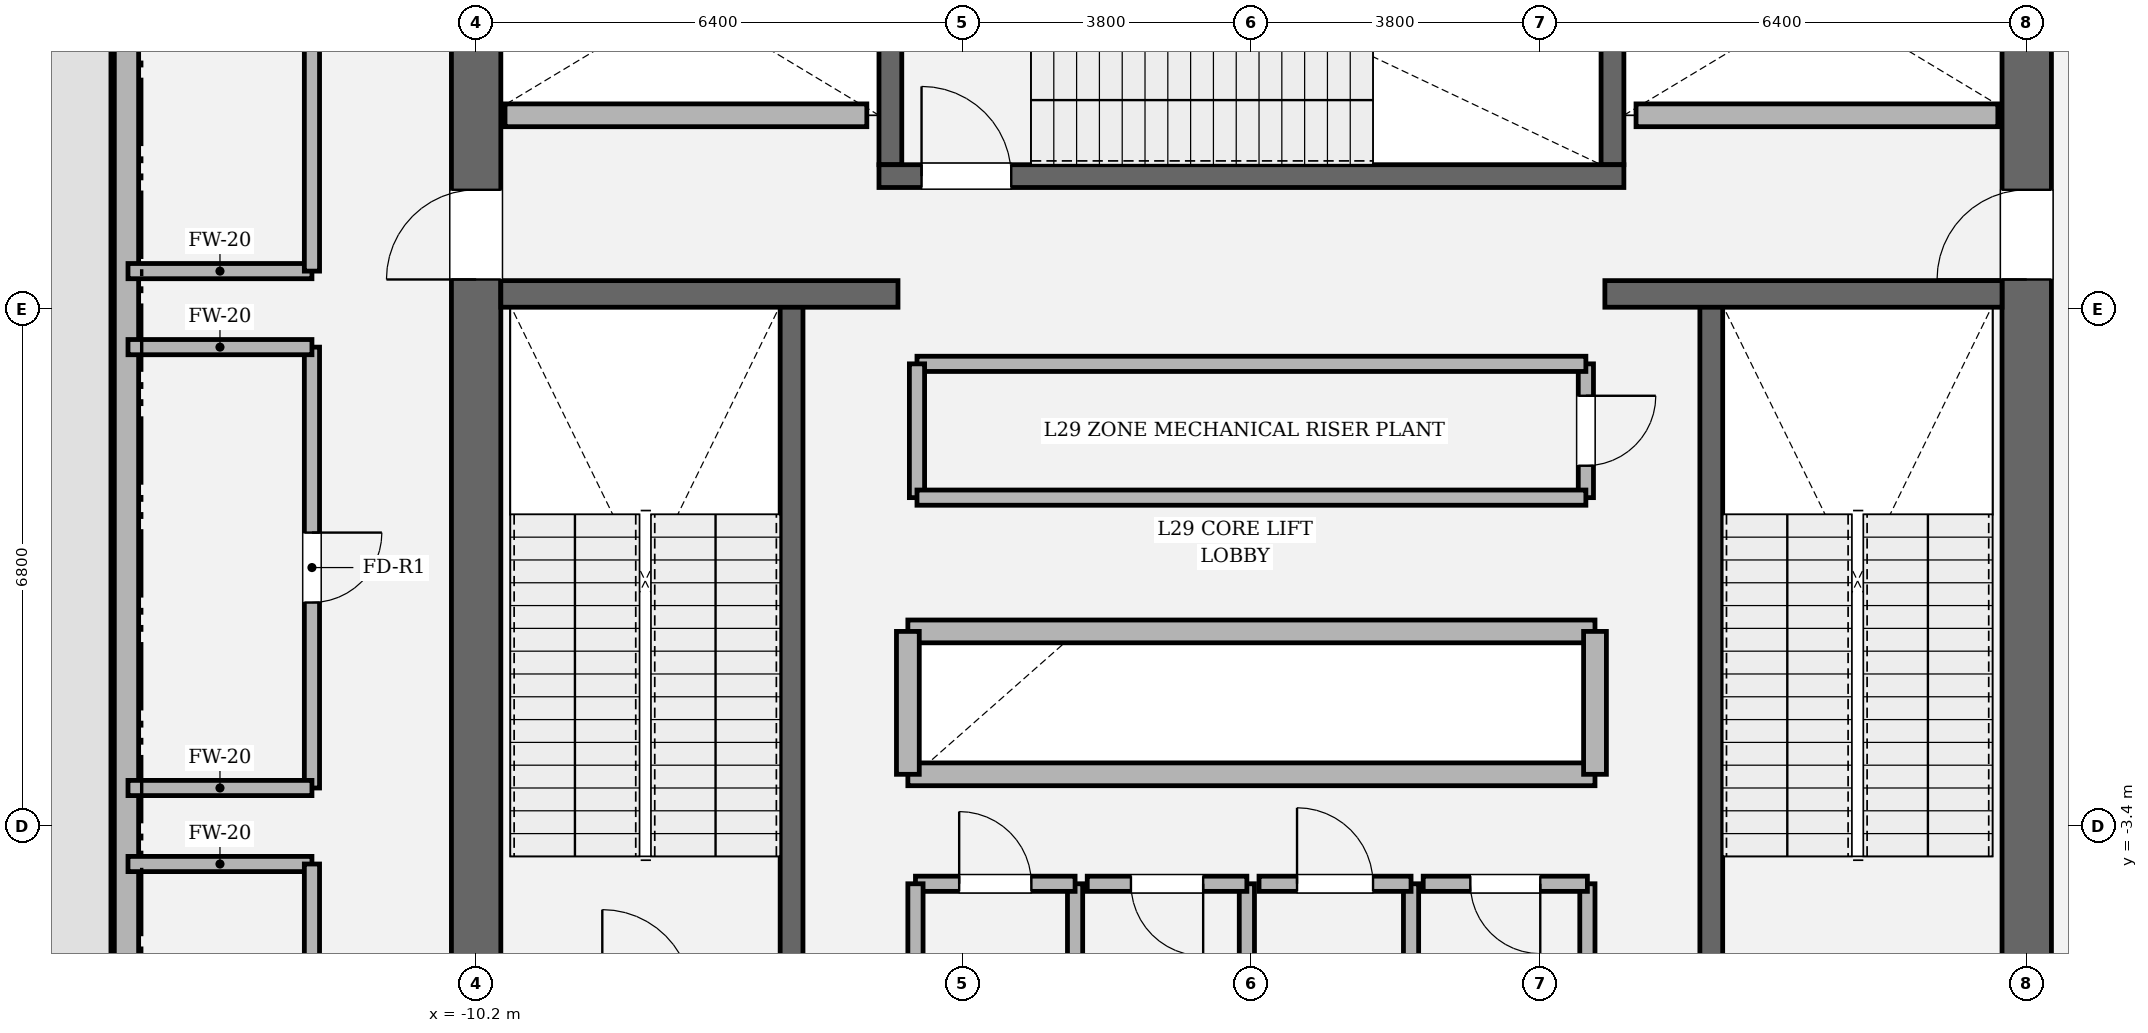
"""IFC4 building model, lengths in metres.
Left out: names, types, materials, properties, quantities, classifications, styles, units other than length and angle.
Written with IfcOpenShell. Run it as: python <this file> out.ifc"""

import sys

from ifc_helpers import new_model, si_unit, direction, frame, frame_2d, origin, place, context, subcontext, project, spatial, rectangle, extrude, element, fill, save


model = new_model("IFC4")
c1 = context("Model", 3, precision=1e-05, world=origin(), true_north=direction((0.0, 1.0)))
c2 = subcontext(c1, "Body", "Model", "MODEL_VIEW")
j1 = project(units=[si_unit("LENGTHUNIT", "METRE"), si_unit("PLANEANGLEUNIT", "RADIAN")], contexts=[c1])
p1 = place(None, origin())
s1 = spatial("IfcSite", under=j1, at=p1, CompositionType="ELEMENT")
p2 = place(p1, origin())
s2 = spatial("IfcBuilding", under=s1, at=p2, CompositionType="ELEMENT")
p3 = place(p2, frame((0.0, 0.0, 125.4)))
s3 = spatial("IfcBuildingStorey", under=s2, at=p3, CompositionType="ELEMENT", Elevation=125.4)
p4 = place(p3, frame((-10.2, -8.875, 0.0), z_axis=(0.0, 0.0, 1.0), x_axis=(0.0, 1.0, 0.0)))
e1 = element("IfcWall", 1, at=p4, inside=s3, PredefinedType="SHEAR", context=c2, shape_type="SweptSolid", body=[
    extrude(rectangle(XDim=17.75, YDim=0.65, at=frame_2d((8.875, 0.0))), origin(), (0.0, 0.0, 1.0), 4.8),
])
p5 = place(p4, frame((12.665, 0.0, 0.0)))
e2 = element("IfcOpeningElement", 2, at=p5, cuts=e1, PredefinedType="OPENING", context=c2, shape_type="SweptSolid", body=[
    extrude(rectangle(XDim=1.18, YDim=2.2, at=frame_2d((0.59, 1.1))), frame((0.0, 0.335, 0.0), z_axis=(0.0, -1.0, 0.0), x_axis=(1.0, 0.0, 0.0)), (0.0, 0.0, 1.0), 0.67),
])
p6 = place(p3, frame((10.2, 8.875, 0.0), z_axis=(0.0, 0.0, 1.0), x_axis=(0.0, -1.0, 0.0)))
e3 = element("IfcWall", 3, at=p6, inside=s3, PredefinedType="SHEAR", context=c2, shape_type="SweptSolid", body=[
    extrude(rectangle(XDim=17.75, YDim=0.65, at=frame_2d((8.875, 0.0))), origin(), (0.0, 0.0, 1.0), 4.8),
])
p7 = place(p6, frame((3.905, 0.0, 0.0)))
e4 = element("IfcOpeningElement", 4, at=p7, cuts=e3, PredefinedType="OPENING", context=c2, shape_type="SweptSolid", body=[
    extrude(rectangle(XDim=1.18, YDim=2.2, at=frame_2d((0.59, 1.1))), frame((0.0, 0.335, 0.0), z_axis=(0.0, -1.0, 0.0), x_axis=(1.0, 0.0, 0.0)), (0.0, 0.0, 1.0), 0.67),
])
for number, where, z_axis, x_axis in (
    (5, (-6.05, -5.5, 0.0), (0.0, 0.0, 1.0), (0.0, 1.0, 0.0)),
    (6, (6.05, 3.45, 0.0), (0.0, 0.0, 1.0), (0.0, -1.0, 0.0)),
):
    element("IfcWall", number, at=place(p3, frame(where, z_axis=z_axis, x_axis=x_axis)), inside=s3, PredefinedType="SOLIDWALL", context=c2, shape_type="SweptSolid", body=[
        extrude(rectangle(XDim=8.95, YDim=0.3, at=frame_2d((4.475, 0.0))), origin(), (0.0, 0.0, 1.0), 4.8),
    ])
for number, where, z_axis, x_axis in (
    (7, (-4.75, 5.3, 0.0), (0.0, 0.0, 1.0), (0.0, 1.0, 0.0)),
    (8, (4.75, 8.875, 0.0), (0.0, 0.0, 1.0), (0.0, -1.0, 0.0)),
):
    element("IfcWall", number, at=place(p3, frame(where, z_axis=z_axis, x_axis=x_axis)), inside=s3, PredefinedType="SOLIDWALL", context=c2, shape_type="SweptSolid", body=[
        extrude(rectangle(XDim=3.575, YDim=0.3, at=frame_2d((1.788, 0.0))), origin(), (0.0, 0.0, 1.0), 4.8),
    ])
p8 = place(p3, frame((-4.9, 5.15, 0.0), z_axis=(0.0, 0.0, 1.0), x_axis=(1.0, 0.0, 0.0)))
e9 = element("IfcWall", 9, at=p8, inside=s3, PredefinedType="SOLIDWALL", context=c2, shape_type="SweptSolid", body=[
    extrude(rectangle(XDim=9.8, YDim=0.3, at=frame_2d((4.9, 0.0))), origin(), (0.0, 0.0, 1.0), 4.8),
])
p9 = place(p8, frame((0.56, 0.0, 0.0)))
e10 = element("IfcOpeningElement", 10, at=p9, cuts=e9, PredefinedType="OPENING", context=c2, shape_type="SweptSolid", body=[
    extrude(rectangle(XDim=1.18, YDim=2.2, at=frame_2d((0.59, 1.1))), frame((0.0, 0.16, 0.0), z_axis=(0.0, -1.0, 0.0), x_axis=(1.0, 0.0, 0.0)), (0.0, 0.0, 1.0), 0.32),
])
for number, where, z_axis, x_axis in (
    (11, (-9.875, 3.6, 0.0), (0.0, 0.0, 1.0), (1.0, 0.0, 0.0)),
    (12, (4.65, 3.6, 0.0), (0.0, 0.0, 1.0), (1.0, 0.0, 0.0)),
):
    element("IfcWall", number, at=place(p3, frame(where, z_axis=z_axis, x_axis=x_axis)), inside=s3, PredefinedType="SOLIDWALL", context=c2, shape_type="SweptSolid", body=[
        extrude(rectangle(XDim=5.225, YDim=0.35, at=frame_2d((2.613, 0.0))), origin(), (0.0, 0.0, 1.0), 4.8),
    ])
p10 = place(p3, frame((-14.8, 11.387, 0.0), z_axis=(0.0, 0.0, 1.0), x_axis=(0.0, -1.0, 0.0)))
e13 = element("IfcWall", 13, at=p10, inside=s3, PredefinedType="SOLIDWALL", context=c2, shape_type="SweptSolid", body=[
    extrude(rectangle(XDim=22.774, YDim=0.32, at=frame_2d((11.387, 0.0))), origin(), (0.0, 0.0, 1.0), 3.194),
])
p11 = place(p10, frame((2.2, 0.0, 0.9)))
e14 = element("IfcOpeningElement", 14, at=p11, cuts=e13, PredefinedType="OPENING", context=c2, shape_type="SweptSolid", body=[
    extrude(rectangle(XDim=2.2, YDim=1.2, at=frame_2d((1.1, 0.6))), frame((0.0, 0.17, 0.0), z_axis=(0.0, -1.0, 0.0), x_axis=(1.0, 0.0, 0.0)), (0.0, 0.0, 1.0), 0.34),
])
p12 = place(p10, frame((18.374, 0.0, 0.9)))
e15 = element("IfcOpeningElement", 15, at=p12, cuts=e13, PredefinedType="OPENING", context=c2, shape_type="SweptSolid", body=[
    extrude(rectangle(XDim=2.2, YDim=1.2, at=frame_2d((1.1, 0.6))), frame((0.0, 0.17, 0.0), z_axis=(0.0, -1.0, 0.0), x_axis=(1.0, 0.0, 0.0)), (0.0, 0.0, 1.0), 0.34),
])
for number, where, z_axis, x_axis in (
    (16, (-4.52, -0.84, 0.0), (0.0, 0.0, 1.0), (1.0, 0.0, 0.0)),
    (17, (-4.52, -2.72, 0.0), (0.0, 0.0, 1.0), (1.0, 0.0, 0.0)),
):
    element("IfcWall", number, at=place(p3, frame(where, z_axis=z_axis, x_axis=x_axis)), inside=s3, PredefinedType="SOLIDWALL", context=c2, shape_type="SweptSolid", body=[
        extrude(rectangle(XDim=9.04, YDim=0.3, at=frame_2d((4.52, 0.0))), origin(), (0.0, 0.0, 1.0), 4.48),
    ])
for number, where, z_axis, x_axis in (
    (18, (-4.52, -2.72, 0.0), (0.0, 0.0, 1.0), (0.0, 1.0, 0.0)),
    (19, (4.52, -2.72, 0.0), (0.0, 0.0, 1.0), (0.0, 1.0, 0.0)),
):
    element("IfcWall", number, at=place(p3, frame(where, z_axis=z_axis, x_axis=x_axis)), inside=s3, PredefinedType="SOLIDWALL", context=c2, shape_type="SweptSolid", body=[
        extrude(rectangle(XDim=1.88, YDim=0.3, at=frame_2d((0.94, 0.0))), origin(), (0.0, 0.0, 1.0), 4.48),
    ])
for number, where, z_axis, x_axis in (
    (20, (-9.82, 5.95, 0.0), (0.0, 0.0, 1.0), (1.0, 0.0, 0.0)),
    (21, (5.06, 5.95, 0.0), (0.0, 0.0, 1.0), (1.0, 0.0, 0.0)),
):
    element("IfcWall", number, at=place(p3, frame(where, z_axis=z_axis, x_axis=x_axis)), inside=s3, PredefinedType="SOLIDWALL", context=c2, shape_type="SweptSolid", body=[
        extrude(rectangle(XDim=4.76, YDim=0.3, at=frame_2d((2.38, 0.0))), origin(), (0.0, 0.0, 1.0), 4.48),
    ])
p13 = place(p3, frame((-2.32, -5.9, 0.0), z_axis=(0.0, 0.0, 1.0), x_axis=(0.0, 1.0, 0.0)))
e22 = element("IfcWall", 22, at=p13, inside=s3, PredefinedType="SOLIDWALL", context=c2, shape_type="SweptSolid", body=[
    extrude(rectangle(XDim=1.74, YDim=0.2, at=frame_2d((0.87, 0.0))), origin(), (0.0, 0.0, 1.0), 4.48),
])
p14 = place(p3, frame((-2.32, -4.16, 0.0), z_axis=(0.0, 0.0, 1.0), x_axis=(-1.0, 0.0, 0.0)))
e23 = element("IfcWall", 23, at=p14, inside=s3, PredefinedType="SOLIDWALL", context=c2, shape_type="SweptSolid", body=[
    extrude(rectangle(XDim=2.1, YDim=0.2, at=frame_2d((1.05, 0.0))), origin(), (0.0, 0.0, 1.0), 4.48),
])
p15 = place(p14, frame((0.575, 0.0, 0.0)))
e24 = element("IfcOpeningElement", 24, at=p15, cuts=e23, PredefinedType="OPENING", context=c2, shape_type="SweptSolid", body=[
    extrude(rectangle(XDim=0.95, YDim=2.15, at=frame_2d((0.475, 1.075))), frame((0.0, 0.11, 0.0), z_axis=(0.0, -1.0, 0.0), x_axis=(1.0, 0.0, 0.0)), (0.0, 0.0, 1.0), 0.22),
])
for number, where, z_axis, x_axis in (
    (25, (-4.42, -4.16, 0.0), (0.0, 0.0, 1.0), (0.0, -1.0, 0.0)),
    (26, (-0.06, -5.9, 0.0), (0.0, 0.0, 1.0), (0.0, 1.0, 0.0)),
):
    element("IfcWall", number, at=place(p3, frame(where, z_axis=z_axis, x_axis=x_axis)), inside=s3, PredefinedType="SOLIDWALL", context=c2, shape_type="SweptSolid", body=[
        extrude(rectangle(XDim=1.74, YDim=0.2, at=frame_2d((0.87, 0.0))), origin(), (0.0, 0.0, 1.0), 4.48),
    ])
p16 = place(p3, frame((-0.06, -4.16, 0.0), z_axis=(0.0, 0.0, 1.0), x_axis=(-1.0, 0.0, 0.0)))
e27 = element("IfcWall", 27, at=p16, inside=s3, PredefinedType="SOLIDWALL", context=c2, shape_type="SweptSolid", body=[
    extrude(rectangle(XDim=2.1, YDim=0.2, at=frame_2d((1.05, 0.0))), origin(), (0.0, 0.0, 1.0), 4.48),
])
p17 = place(p16, frame((0.575, 0.0, 0.0)))
e28 = element("IfcOpeningElement", 28, at=p17, cuts=e27, PredefinedType="OPENING", context=c2, shape_type="SweptSolid", body=[
    extrude(rectangle(XDim=0.95, YDim=2.15, at=frame_2d((0.475, 1.075))), frame((0.0, 0.11, 0.0), z_axis=(0.0, -1.0, 0.0), x_axis=(1.0, 0.0, 0.0)), (0.0, 0.0, 1.0), 0.22),
])
p18 = place(p3, frame((2.1, -5.9, 0.0), z_axis=(0.0, 0.0, 1.0), x_axis=(0.0, 1.0, 0.0)))
e29 = element("IfcWall", 29, at=p18, inside=s3, PredefinedType="SOLIDWALL", context=c2, shape_type="SweptSolid", body=[
    extrude(rectangle(XDim=1.74, YDim=0.2, at=frame_2d((0.87, 0.0))), origin(), (0.0, 0.0, 1.0), 4.48),
])
p19 = place(p3, frame((2.1, -4.16, 0.0), z_axis=(0.0, 0.0, 1.0), x_axis=(-1.0, 0.0, 0.0)))
e30 = element("IfcWall", 30, at=p19, inside=s3, PredefinedType="SOLIDWALL", context=c2, shape_type="SweptSolid", body=[
    extrude(rectangle(XDim=2.0, YDim=0.2, at=frame_2d((1.0, 0.0))), origin(), (0.0, 0.0, 1.0), 4.48),
])
p20 = place(p19, frame((0.5, 0.0, 0.0)))
e31 = element("IfcOpeningElement", 31, at=p20, cuts=e30, PredefinedType="OPENING", context=c2, shape_type="SweptSolid", body=[
    extrude(rectangle(XDim=1.0, YDim=2.15, at=frame_2d((0.5, 1.075))), frame((0.0, 0.11, 0.0), z_axis=(0.0, -1.0, 0.0), x_axis=(1.0, 0.0, 0.0)), (0.0, 0.0, 1.0), 0.22),
])
p21 = place(p3, frame((4.42, -5.9, 0.0), z_axis=(0.0, 0.0, 1.0), x_axis=(0.0, 1.0, 0.0)))
e32 = element("IfcWall", 32, at=p21, inside=s3, PredefinedType="SOLIDWALL", context=c2, shape_type="SweptSolid", body=[
    extrude(rectangle(XDim=1.74, YDim=0.2, at=frame_2d((0.87, 0.0))), origin(), (0.0, 0.0, 1.0), 4.48),
])
p22 = place(p3, frame((4.42, -4.16, 0.0), z_axis=(0.0, 0.0, 1.0), x_axis=(-1.0, 0.0, 0.0)))
e33 = element("IfcWall", 33, at=p22, inside=s3, PredefinedType="SOLIDWALL", context=c2, shape_type="SweptSolid", body=[
    extrude(rectangle(XDim=2.16, YDim=0.2, at=frame_2d((1.08, 0.0))), origin(), (0.0, 0.0, 1.0), 4.48),
])
p23 = place(p22, frame((0.62, 0.0, 0.0)))
e34 = element("IfcOpeningElement", 34, at=p23, cuts=e33, PredefinedType="OPENING", context=c2, shape_type="SweptSolid", body=[
    extrude(rectangle(XDim=0.92, YDim=2.1, at=frame_2d((0.46, 1.05))), frame((0.0, 0.11, 0.0), z_axis=(0.0, -1.0, 0.0), x_axis=(1.0, 0.0, 0.0)), (0.0, 0.0, 1.0), 0.22),
])
p24 = place(p3, frame((4.4, 0.92, 0.0), z_axis=(0.0, 0.0, 1.0), x_axis=(0.0, 1.0, 0.0)))
e35 = element("IfcWall", 35, at=p24, inside=s3, PredefinedType="SOLIDWALL", context=c2, shape_type="SweptSolid", body=[
    extrude(rectangle(XDim=1.76, YDim=0.2, at=frame_2d((0.88, 0.0))), origin(), (0.0, 0.0, 1.0), 4.48),
])
p25 = place(p24, frame((0.42, 0.0, 0.0)))
e36 = element("IfcOpeningElement", 36, at=p25, cuts=e35, PredefinedType="OPENING", context=c2, shape_type="SweptSolid", body=[
    extrude(rectangle(XDim=0.92, YDim=2.1, at=frame_2d((0.46, 1.05))), frame((0.0, 0.11, 0.0), z_axis=(0.0, -1.0, 0.0), x_axis=(1.0, 0.0, 0.0)), (0.0, 0.0, 1.0), 0.22),
])
p26 = place(p3, frame((4.4, 2.68, 0.0), z_axis=(0.0, 0.0, 1.0), x_axis=(-1.0, 0.0, 0.0)))
e37 = element("IfcWall", 37, at=p26, inside=s3, PredefinedType="SOLIDWALL", context=c2, shape_type="SweptSolid", body=[
    extrude(rectangle(XDim=8.8, YDim=0.2, at=frame_2d((4.4, 0.0))), origin(), (0.0, 0.0, 1.0), 4.48),
])
p27 = place(p3, frame((-4.4, 2.68, 0.0), z_axis=(0.0, 0.0, 1.0), x_axis=(0.0, -1.0, 0.0)))
e38 = element("IfcWall", 38, at=p27, inside=s3, PredefinedType="SOLIDWALL", context=c2, shape_type="SweptSolid", body=[
    extrude(rectangle(XDim=1.76, YDim=0.2, at=frame_2d((0.88, 0.0))), origin(), (0.0, 0.0, 1.0), 4.48),
])
p28 = place(p3, frame((-4.4, 0.92, 0.0), z_axis=(0.0, 0.0, 1.0), x_axis=(1.0, 0.0, 0.0)))
e39 = element("IfcWall", 39, at=p28, inside=s3, PredefinedType="SOLIDWALL", context=c2, shape_type="SweptSolid", body=[
    extrude(rectangle(XDim=8.8, YDim=0.2, at=frame_2d((4.4, 0.0))), origin(), (0.0, 0.0, 1.0), 4.48),
])
p29 = place(p3, frame((-14.78, -3.9, 0.0), z_axis=(0.0, 0.0, 1.0), x_axis=(1.0, 0.0, 0.0)))
e40 = element("IfcWall", 40, at=p29, inside=s3, PredefinedType="SOLIDWALL", context=c2, shape_type="SweptSolid", body=[
    extrude(rectangle(XDim=2.42, YDim=0.2, at=frame_2d((1.21, 0.0))), origin(), (0.0, 0.0, 1.0), 3.194),
])
p30 = place(p3, frame((-12.36, -3.9, 0.0), z_axis=(0.0, 0.0, 1.0), x_axis=(0.0, -1.0, 0.0)))
e41 = element("IfcWall", 41, at=p30, inside=s3, PredefinedType="SOLIDWALL", context=c2, shape_type="SweptSolid", body=[
    extrude(rectangle(XDim=7.3, YDim=0.2, at=frame_2d((3.65, 0.0))), origin(), (0.0, 0.0, 1.0), 4.48),
])
p31 = place(p30, frame((3.1, 0.0, 0.0)))
e42 = element("IfcOpeningElement", 42, at=p31, cuts=e41, PredefinedType="OPENING", context=c2, shape_type="SweptSolid", body=[
    extrude(rectangle(XDim=1.1, YDim=2.2, at=frame_2d((0.55, 1.1))), frame((0.0, 0.11, 0.0), z_axis=(0.0, -1.0, 0.0), x_axis=(1.0, 0.0, 0.0)), (0.0, 0.0, 1.0), 0.22),
])
p32 = place(p3, frame((-12.36, 2.9, 0.0), z_axis=(0.0, 0.0, 1.0), x_axis=(0.0, -1.0, 0.0)))
e43 = element("IfcWall", 43, at=p32, inside=s3, PredefinedType="SOLIDWALL", context=c2, shape_type="SweptSolid", body=[
    extrude(rectangle(XDim=5.8, YDim=0.2, at=frame_2d((2.9, 0.0))), origin(), (0.0, 0.0, 1.0), 4.48),
])
p33 = place(p32, frame((2.44, 0.0, 0.0)))
e44 = element("IfcOpeningElement", 44, at=p33, cuts=e43, PredefinedType="OPENING", context=c2, shape_type="SweptSolid", body=[
    extrude(rectangle(XDim=0.92, YDim=2.1, at=frame_2d((0.46, 1.05))), frame((0.0, 0.11, 0.0), z_axis=(0.0, -1.0, 0.0), x_axis=(1.0, 0.0, 0.0)), (0.0, 0.0, 1.0), 0.22),
])
for number, where, z_axis, x_axis in (
    (45, (-12.36, -2.9, 0.0), (0.0, 0.0, 1.0), (-1.0, 0.0, 0.0)),
    (46, (-14.78, 2.9, 0.0), (0.0, 0.0, 1.0), (1.0, 0.0, 0.0)),
    (47, (-12.36, 3.9, 0.0), (0.0, 0.0, 1.0), (-1.0, 0.0, 0.0)),
):
    element("IfcWall", number, at=place(p3, frame(where, z_axis=z_axis, x_axis=x_axis)), inside=s3, PredefinedType="SOLIDWALL", context=c2, shape_type="SweptSolid", body=[
        extrude(rectangle(XDim=2.42, YDim=0.2, at=frame_2d((1.21, 0.0))), origin(), (0.0, 0.0, 1.0), 3.194),
    ])
p34 = place(p3, frame((-12.36, 11.2, 0.0), z_axis=(0.0, 0.0, 1.0), x_axis=(0.0, -1.0, 0.0)))
e48 = element("IfcWall", 48, at=p34, inside=s3, PredefinedType="SOLIDWALL", context=c2, shape_type="SweptSolid", body=[
    extrude(rectangle(XDim=7.3, YDim=0.2, at=frame_2d((3.65, 0.0))), origin(), (0.0, 0.0, 1.0), 4.48),
])
p35 = place(p34, frame((3.1, 0.0, 0.0)))
e49 = element("IfcOpeningElement", 49, at=p35, cuts=e48, PredefinedType="OPENING", context=c2, shape_type="SweptSolid", body=[
    extrude(rectangle(XDim=1.1, YDim=2.2, at=frame_2d((0.55, 1.1))), frame((0.0, 0.11, 0.0), z_axis=(0.0, -1.0, 0.0), x_axis=(1.0, 0.0, 0.0)), (0.0, 0.0, 1.0), 0.22),
])
p36 = place(p9, origin())
e50 = element("IfcDoor", 50, at=p36, inside=s3, OperationType="SINGLE_SWING_LEFT", PredefinedType="DOOR", context=c2, shape_type="SweptSolid", body=[
    extrude(rectangle(XDim=1.18, YDim=2.2, at=frame_2d((0.59, 1.1))), frame((0.0, 0.025, 0.0), z_axis=(0.0, -1.0, 0.0), x_axis=(1.0, 0.0, 0.0)), (0.0, 0.0, 1.0), 0.05),
])
fill(e10, e50)
p37 = place(p5, origin())
e51 = element("IfcDoor", 51, at=p37, inside=s3, OperationType="SINGLE_SWING_LEFT", PredefinedType="DOOR", context=c2, shape_type="SweptSolid", body=[
    extrude(rectangle(XDim=1.18, YDim=2.2, at=frame_2d((0.59, 1.1))), frame((0.0, 0.025, 0.0), z_axis=(0.0, -1.0, 0.0), x_axis=(1.0, 0.0, 0.0)), (0.0, 0.0, 1.0), 0.05),
])
fill(e2, e51)
p38 = place(p7, origin())
e52 = element("IfcDoor", 52, at=p38, inside=s3, OperationType="SINGLE_SWING_RIGHT", PredefinedType="DOOR", context=c2, shape_type="SweptSolid", body=[
    extrude(rectangle(XDim=1.18, YDim=2.2, at=frame_2d((0.59, 1.1))), frame((0.0, 0.025, 0.0), z_axis=(0.0, -1.0, 0.0), x_axis=(1.0, 0.0, 0.0)), (0.0, 0.0, 1.0), 0.05),
])
fill(e4, e52)
p39 = place(p15, origin())
e53 = element("IfcDoor", 53, at=p39, inside=s3, OperationType="SINGLE_SWING_RIGHT", PredefinedType="DOOR", context=c2, shape_type="SweptSolid", body=[
    extrude(rectangle(XDim=0.95, YDim=2.15, at=frame_2d((0.475, 1.075))), frame((0.0, 0.025, 0.0), z_axis=(0.0, -1.0, 0.0), x_axis=(1.0, 0.0, 0.0)), (0.0, 0.0, 1.0), 0.05),
])
fill(e24, e53)
p40 = place(p17, origin())
e54 = element("IfcDoor", 54, at=p40, inside=s3, OperationType="SINGLE_SWING_LEFT", PredefinedType="DOOR", context=c2, shape_type="SweptSolid", body=[
    extrude(rectangle(XDim=0.95, YDim=2.15, at=frame_2d((0.475, 1.075))), frame((0.0, 0.025, 0.0), z_axis=(0.0, -1.0, 0.0), x_axis=(1.0, 0.0, 0.0)), (0.0, 0.0, 1.0), 0.05),
])
fill(e28, e54)
p41 = place(p20, origin())
e55 = element("IfcDoor", 55, at=p41, inside=s3, OperationType="SINGLE_SWING_RIGHT", PredefinedType="DOOR", context=c2, shape_type="SweptSolid", body=[
    extrude(rectangle(XDim=1.0, YDim=2.15, at=frame_2d((0.5, 1.075))), frame((0.0, 0.025, 0.0), z_axis=(0.0, -1.0, 0.0), x_axis=(1.0, 0.0, 0.0)), (0.0, 0.0, 1.0), 0.05),
])
fill(e31, e55)
p42 = place(p23, origin())
e56 = element("IfcDoor", 56, at=p42, inside=s3, OperationType="SINGLE_SWING_LEFT", PredefinedType="DOOR", context=c2, shape_type="SweptSolid", body=[
    extrude(rectangle(XDim=0.92, YDim=2.1, at=frame_2d((0.46, 1.05))), frame((0.0, 0.025, 0.0), z_axis=(0.0, -1.0, 0.0), x_axis=(1.0, 0.0, 0.0)), (0.0, 0.0, 1.0), 0.05),
])
fill(e34, e56)
p43 = place(p25, origin())
e57 = element("IfcDoor", 57, at=p43, inside=s3, OperationType="SINGLE_SWING_RIGHT", PredefinedType="DOOR", context=c2, shape_type="SweptSolid", body=[
    extrude(rectangle(XDim=0.92, YDim=2.1, at=frame_2d((0.46, 1.05))), frame((0.0, 0.025, 0.0), z_axis=(0.0, -1.0, 0.0), x_axis=(1.0, 0.0, 0.0)), (0.0, 0.0, 1.0), 0.05),
])
fill(e36, e57)
p44 = place(p33, origin())
e58 = element("IfcDoor", 58, at=p44, inside=s3, OperationType="SINGLE_SWING_LEFT", PredefinedType="DOOR", context=c2, shape_type="SweptSolid", body=[
    extrude(rectangle(XDim=0.92, YDim=2.1, at=frame_2d((0.46, 1.05))), frame((0.0, 0.025, 0.0), z_axis=(0.0, -1.0, 0.0), x_axis=(1.0, 0.0, 0.0)), (0.0, 0.0, 1.0), 0.05),
])
fill(e44, e58)
save(model, sys.argv[1])
